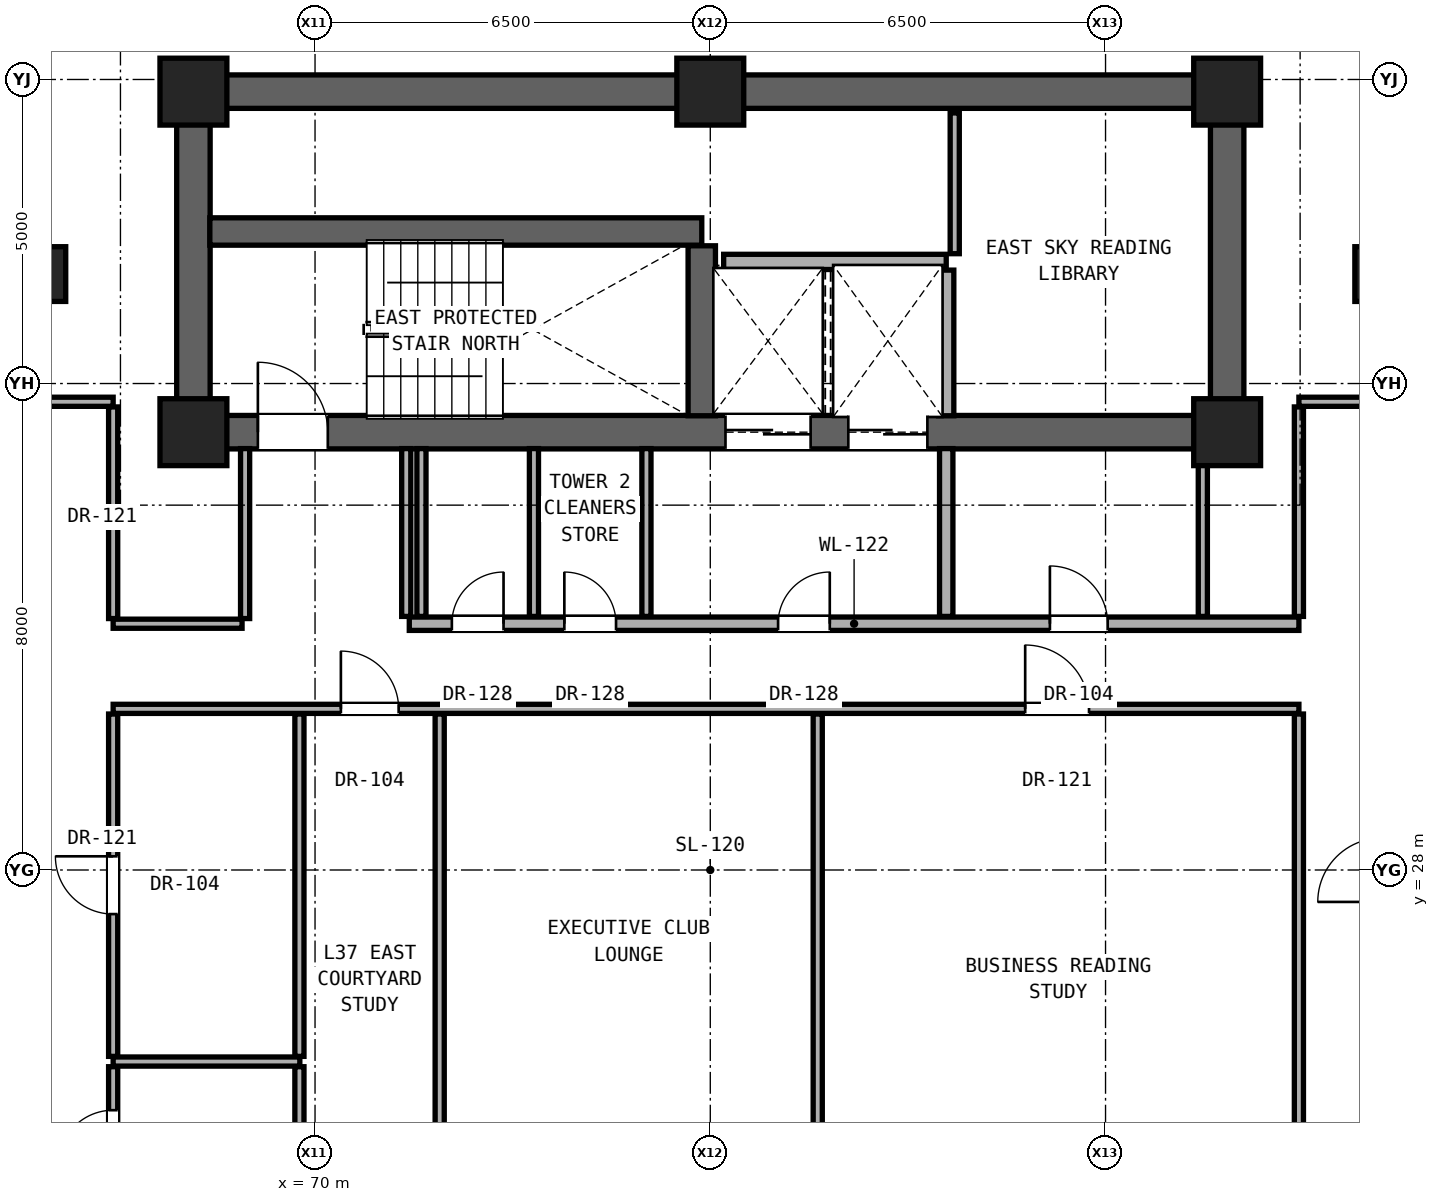
"""IFC4 building model, lengths in metres.
Left out: names, types, materials, properties, quantities, classifications, styles, units other than length and angle.
Written with IfcOpenShell. Run it as: python <this file> out.ifc"""

import sys

from ifc_helpers import new_model, si_unit, direction, frame, frame_2d, origin, origin_2d, place, context, subcontext, project, spatial, rectangle, extrude, element, fill, save


model = new_model("IFC4")
c1 = context("Model", 3, precision=1e-05, world=origin(), true_north=direction((0.0, 1.0)))
c2 = subcontext(c1, "Body", "Model", "MODEL_VIEW")
j1 = project(units=[si_unit("LENGTHUNIT", "METRE"), si_unit("PLANEANGLEUNIT", "RADIAN")], contexts=[c1])
p1 = place(None, origin())
s1 = spatial("IfcSite", under=j1, at=p1, CompositionType="ELEMENT")
p2 = place(p1, origin())
s2 = spatial("IfcBuilding", under=s1, at=p2, CompositionType="ELEMENT")
p3 = place(p2, frame((0.0, 0.0, 131.3)))
s3 = spatial("IfcBuildingStorey", under=s2, at=p3, CompositionType="ELEMENT", Elevation=131.3)
for number, where, z_axis, x_axis in (
    (1, (68.0, 35.2, 0.0), (0.0, 0.0, 1.0), (1.0, 0.0, 0.0)),
    (2, (85.0, 35.2, 0.0), (0.0, 0.0, 1.0), (1.0, 0.0, 0.0)),
    (3, (68.0, 40.8, 0.0), (0.0, 0.0, 1.0), (1.0, 0.0, 0.0)),
    (4, (76.5, 40.8, 0.0), (0.0, 0.0, 1.0), (1.0, 0.0, 0.0)),
    (5, (85.0, 40.8, 0.0), (0.0, 0.0, 1.0), (1.0, 0.0, 0.0)),
):
    element("IfcColumn", number, at=place(p3, frame(where, z_axis=z_axis, x_axis=x_axis)), inside=s3, PredefinedType="COLUMN", context=c2, shape_type="SweptSolid", body=[
        extrude(rectangle(XDim=1.1, YDim=1.1, at=origin_2d()), origin(), (0.0, 0.0, 1.0), 3.3),
    ])
for number, where, z_axis, x_axis in (
    (6, (65.6, 37.8, 0.0), (0.0, 0.0, 1.0), (1.0, 0.0, 0.0)),
    (7, (87.4, 37.8, 0.0), (0.0, 0.0, 1.0), (1.0, 0.0, 0.0)),
):
    element("IfcColumn", number, at=place(p3, frame(where, z_axis=z_axis, x_axis=x_axis)), inside=s3, PredefinedType="PILASTER", context=c2, shape_type="SweptSolid", body=[
        extrude(rectangle(XDim=0.6, YDim=0.9, at=origin_2d()), origin(), (0.0, 0.0, 1.0), 3.3),
    ])
p4 = place(p3, frame((68.0, 40.8, 0.0), z_axis=(0.0, 0.0, 1.0), x_axis=(1.0, 0.0, 0.0)))
e8 = element("IfcWall", 8, at=p4, inside=s3, PredefinedType="SHEAR", context=c2, shape_type="SweptSolid", body=[
    extrude(rectangle(XDim=17.0, YDim=0.55, at=frame_2d((8.5, 0.0))), origin(), (0.0, 0.0, 1.0), 3.08),
])
for number, where, z_axis, x_axis in (
    (9, (68.0, 35.2, 0.0), (0.0, 0.0, 1.0), (0.0, 1.0, 0.0)),
    (10, (85.0, 35.2, 0.0), (0.0, 0.0, 1.0), (0.0, 1.0, 0.0)),
):
    element("IfcWall", number, at=place(p3, frame(where, z_axis=z_axis, x_axis=x_axis)), inside=s3, PredefinedType="SHEAR", context=c2, shape_type="SweptSolid", body=[
        extrude(rectangle(XDim=5.6, YDim=0.55, at=frame_2d((2.8, 0.0))), origin(), (0.0, 0.0, 1.0), 3.08),
    ])
p5 = place(p3, frame((68.0, 35.2, 0.0), z_axis=(0.0, 0.0, 1.0), x_axis=(1.0, 0.0, 0.0)))
e11 = element("IfcWall", 11, at=p5, inside=s3, PredefinedType="SHEAR", context=c2, shape_type="SweptSolid", body=[
    extrude(rectangle(XDim=17.0, YDim=0.55, at=frame_2d((8.5, 0.0))), origin(), (0.0, 0.0, 1.0), 3.08),
])
p6 = place(p5, frame((1.06, 0.0, 0.0)))
e12 = element("IfcOpeningElement", 12, at=p6, cuts=e11, PredefinedType="OPENING", context=c2, shape_type="SweptSolid", body=[
    extrude(rectangle(XDim=1.15, YDim=2.2, at=frame_2d((0.575, 1.1))), frame((0.0, 0.285, 0.0), z_axis=(0.0, -1.0, 0.0), x_axis=(1.0, 0.0, 0.0)), (0.0, 0.0, 1.0), 0.57),
])
p7 = place(p5, frame((8.75, 0.0, 0.0)))
e13 = element("IfcOpeningElement", 13, at=p7, cuts=e11, PredefinedType="OPENING", context=c2, shape_type="SweptSolid", body=[
    extrude(rectangle(XDim=1.4, YDim=2.35, at=frame_2d((0.7, 1.175))), frame((0.0, 0.285, 0.0), z_axis=(0.0, -1.0, 0.0), x_axis=(1.0, 0.0, 0.0)), (0.0, 0.0, 1.0), 0.57),
])
p8 = place(p5, frame((10.77, 0.0, 0.0)))
e14 = element("IfcOpeningElement", 14, at=p8, cuts=e11, PredefinedType="OPENING", context=c2, shape_type="SweptSolid", body=[
    extrude(rectangle(XDim=1.3, YDim=2.3, at=frame_2d((0.65, 1.15))), frame((0.0, 0.285, 0.0), z_axis=(0.0, -1.0, 0.0), x_axis=(1.0, 0.0, 0.0)), (0.0, 0.0, 1.0), 0.57),
])
p9 = place(p3, frame((66.68, 24.85, 0.0), z_axis=(0.0, 0.0, 1.0), x_axis=(1.0, 0.0, 0.0)))
e15 = element("IfcWall", 15, at=p9, inside=s3, PredefinedType="PARTITIONING", context=c2, shape_type="SweptSolid", body=[
    extrude(rectangle(XDim=3.07, YDim=0.15, at=frame_2d((1.535, 0.0))), origin(), (0.0, 0.0, 1.0), 2.216),
])
p10 = place(p3, frame((66.68, 30.65, 0.0), z_axis=(0.0, 0.0, 1.0), x_axis=(1.0, 0.0, 0.0)))
e16 = element("IfcWall", 16, at=p10, inside=s3, PredefinedType="PARTITIONING", context=c2, shape_type="SweptSolid", body=[
    extrude(rectangle(XDim=19.5, YDim=0.15, at=frame_2d((9.75, 0.0))), origin(), (0.0, 0.0, 1.0), 2.216),
])
p11 = place(p10, frame((3.745, 0.0, 0.0)))
e17 = element("IfcOpeningElement", 17, at=p11, cuts=e16, PredefinedType="OPENING", context=c2, shape_type="SweptSolid", body=[
    extrude(rectangle(XDim=0.95, YDim=2.15, at=frame_2d((0.475, 1.075))), frame((0.0, 0.085, 0.0), z_axis=(0.0, -1.0, 0.0), x_axis=(1.0, 0.0, 0.0)), (0.0, 0.0, 1.0), 0.17),
])
p12 = place(p10, frame((14.999, 0.0, 0.0)))
e18 = element("IfcOpeningElement", 18, at=p12, cuts=e16, PredefinedType="OPENING", context=c2, shape_type="SweptSolid", body=[
    extrude(rectangle(XDim=1.05, YDim=2.2, at=frame_2d((0.525, 1.1))), frame((0.0, 0.085, 0.0), z_axis=(0.0, -1.0, 0.0), x_axis=(1.0, 0.0, 0.0)), (0.0, 0.0, 1.0), 0.17),
])
p13 = place(p3, frame((66.68, 32.05, 0.0), z_axis=(0.0, 0.0, 1.0), x_axis=(1.0, 0.0, 0.0)))
e19 = element("IfcWall", 19, at=p13, inside=s3, PredefinedType="PARTITIONING", context=c2, shape_type="SweptSolid", body=[
    extrude(rectangle(XDim=2.12, YDim=0.15, at=frame_2d((1.06, 0.0))), origin(), (0.0, 0.0, 1.0), 2.216),
])
p14 = place(p3, frame((71.55, 32.05, 0.0), z_axis=(0.0, 0.0, 1.0), x_axis=(1.0, 0.0, 0.0)))
e20 = element("IfcWall", 20, at=p14, inside=s3, PredefinedType="SOLIDWALL", context=c2, shape_type="SweptSolid", body=[
    extrude(rectangle(XDim=14.63, YDim=0.22, at=frame_2d((7.315, 0.0))), origin(), (0.0, 0.0, 1.0), 2.216),
])
p15 = place(p14, frame((6.065, 0.0, 0.0)))
e21 = element("IfcOpeningElement", 21, at=p15, cuts=e20, PredefinedType="OPENING", context=c2, shape_type="SweptSolid", body=[
    extrude(rectangle(XDim=0.85, YDim=2.01, at=frame_2d((0.425, 1.005))), frame((0.0, 0.12, 0.0), z_axis=(0.0, -1.0, 0.0), x_axis=(1.0, 0.0, 0.0)), (0.0, 0.0, 1.0), 0.24),
])
p16 = place(p14, frame((10.535, 0.0, 0.0)))
e22 = element("IfcOpeningElement", 22, at=p16, cuts=e20, PredefinedType="OPENING", context=c2, shape_type="SweptSolid", body=[
    extrude(rectangle(XDim=0.95, YDim=2.15, at=frame_2d((0.475, 1.075))), frame((0.0, 0.12, 0.0), z_axis=(0.0, -1.0, 0.0), x_axis=(1.0, 0.0, 0.0)), (0.0, 0.0, 1.0), 0.24),
])
p17 = place(p14, frame((0.7, 0.0, 0.0)))
e23 = element("IfcOpeningElement", 23, at=p17, cuts=e20, PredefinedType="OPENING", context=c2, shape_type="SweptSolid", body=[
    extrude(rectangle(XDim=0.85, YDim=2.01, at=frame_2d((0.425, 1.005))), frame((0.0, 0.12, 0.0), z_axis=(0.0, -1.0, 0.0), x_axis=(1.0, 0.0, 0.0)), (0.0, 0.0, 1.0), 0.24),
])
p18 = place(p14, frame((2.55, 0.0, 0.0)))
e24 = element("IfcOpeningElement", 24, at=p18, cuts=e20, PredefinedType="OPENING", context=c2, shape_type="SweptSolid", body=[
    extrude(rectangle(XDim=0.85, YDim=2.01, at=frame_2d((0.425, 1.005))), frame((0.0, 0.12, 0.0), z_axis=(0.0, -1.0, 0.0), x_axis=(1.0, 0.0, 0.0)), (0.0, 0.0, 1.0), 0.24),
])
p19 = place(p3, frame((65.32, 35.7, 0.0), z_axis=(0.0, 0.0, 1.0), x_axis=(1.0, 0.0, 0.0)))
e25 = element("IfcWall", 25, at=p19, inside=s3, PredefinedType="PARTITIONING", context=c2, shape_type="SweptSolid", body=[
    extrude(rectangle(XDim=1.36, YDim=0.15, at=frame_2d((0.68, 0.0))), origin(), (0.0, 0.0, 1.0), 3.08),
])
p20 = place(p3, frame((86.18, 35.7, 0.0), z_axis=(0.0, 0.0, 1.0), x_axis=(1.0, 0.0, 0.0)))
e26 = element("IfcWall", 26, at=p20, inside=s3, PredefinedType="PARTITIONING", context=c2, shape_type="SweptSolid", body=[
    extrude(rectangle(XDim=1.36, YDim=0.15, at=frame_2d((0.68, 0.0))), origin(), (0.0, 0.0, 1.0), 3.08),
])
p21 = place(p3, frame((76.72, 38.0, 0.0), z_axis=(0.0, 0.0, 1.0), x_axis=(1.0, 0.0, 0.0)))
e27 = element("IfcWall", 27, at=p21, inside=s3, PredefinedType="SOLIDWALL", context=c2, shape_type="SweptSolid", body=[
    extrude(rectangle(XDim=3.66, YDim=0.25, at=frame_2d((1.83, 0.0))), origin(), (0.0, 0.0, 1.0), 3.08),
])
p22 = place(p3, frame((68.27, 38.5, 0.0), z_axis=(0.0, 0.0, 1.0), x_axis=(1.0, 0.0, 0.0)))
e28 = element("IfcWall", 28, at=p22, inside=s3, PredefinedType="SHEAR", context=c2, shape_type="SweptSolid", body=[
    extrude(rectangle(XDim=8.09, YDim=0.45, at=frame_2d((4.045, 0.0))), origin(), (0.0, 0.0, 1.0), 3.08),
])
p23 = place(p3, frame((66.68, 22.435, 0.0), z_axis=(0.0, 0.0, 1.0), x_axis=(0.0, 1.0, 0.0)))
e29 = element("IfcWall", 29, at=p23, inside=s3, PredefinedType="PARTITIONING", context=c2, shape_type="SweptSolid", body=[
    extrude(rectangle(XDim=2.33, YDim=0.15, at=frame_2d((1.165, 0.0))), origin(), (0.0, 0.0, 1.0), 3.08),
])
p24 = place(p23, frame((0.715, 0.0, 0.0)))
e30 = element("IfcOpeningElement", 30, at=p24, cuts=e29, PredefinedType="OPENING", context=c2, shape_type="SweptSolid", body=[
    extrude(rectangle(XDim=0.9, YDim=2.1, at=frame_2d((0.45, 1.05))), frame((0.0, 0.085, 0.0), z_axis=(0.0, -1.0, 0.0), x_axis=(1.0, 0.0, 0.0)), (0.0, 0.0, 1.0), 0.17),
])
p25 = place(p3, frame((66.68, 24.935, 0.0), z_axis=(0.0, 0.0, 1.0), x_axis=(0.0, 1.0, 0.0)))
e31 = element("IfcWall", 31, at=p25, inside=s3, PredefinedType="PARTITIONING", context=c2, shape_type="SweptSolid", body=[
    extrude(rectangle(XDim=5.63, YDim=0.15, at=frame_2d((2.815, 0.0))), origin(), (0.0, 0.0, 1.0), 2.376),
])
p26 = place(p25, frame((2.34, 0.0, 0.0)))
e32 = element("IfcOpeningElement", 32, at=p26, cuts=e31, PredefinedType="OPENING", context=c2, shape_type="SweptSolid", body=[
    extrude(rectangle(XDim=0.95, YDim=2.15, at=frame_2d((0.475, 1.075))), frame((0.0, 0.085, 0.0), z_axis=(0.0, -1.0, 0.0), x_axis=(1.0, 0.0, 0.0)), (0.0, 0.0, 1.0), 0.17),
])
p27 = place(p3, frame((66.68, 32.135, 0.0), z_axis=(0.0, 0.0, 1.0), x_axis=(0.0, 1.0, 0.0)))
e33 = element("IfcWall", 33, at=p27, inside=s3, PredefinedType="PARTITIONING", context=c2, shape_type="SweptSolid", body=[
    extrude(rectangle(XDim=3.48, YDim=0.15, at=frame_2d((1.74, 0.0))), origin(), (0.0, 0.0, 1.0), 2.472),
])
p28 = place(p3, frame((68.85, 32.135, 0.0), z_axis=(0.0, 0.0, 1.0), x_axis=(0.0, 1.0, 0.0)))
e34 = element("IfcWall", 34, at=p28, inside=s3, PredefinedType="PARTITIONING", context=c2, shape_type="SweptSolid", body=[
    extrude(rectangle(XDim=2.795, YDim=0.15, at=frame_2d((1.397, 0.0))), origin(), (0.0, 0.0, 1.0), 3.08),
])
p29 = place(p3, frame((69.743, 22.435, 0.0), z_axis=(0.0, 0.0, 1.0), x_axis=(0.0, 1.0, 0.0)))
e35 = element("IfcWall", 35, at=p29, inside=s3, PredefinedType="PARTITIONING", context=c2, shape_type="SweptSolid", body=[
    extrude(rectangle(XDim=2.33, YDim=0.15, at=frame_2d((1.165, 0.0))), origin(), (0.0, 0.0, 1.0), 3.08),
])
p30 = place(p3, frame((69.743, 24.935, 0.0), z_axis=(0.0, 0.0, 1.0), x_axis=(0.0, 1.0, 0.0)))
e36 = element("IfcWall", 36, at=p30, inside=s3, PredefinedType="PARTITIONING", context=c2, shape_type="SweptSolid", body=[
    extrude(rectangle(XDim=5.63, YDim=0.15, at=frame_2d((2.815, 0.0))), origin(), (0.0, 0.0, 1.0), 2.216),
])
for number, where, z_axis, x_axis in (
    (37, (71.5, 32.17, 0.0), (0.0, 0.0, 1.0), (0.0, 1.0, 0.0)),
    (38, (71.75, 32.17, 0.0), (0.0, 0.0, 1.0), (0.0, 1.0, 0.0)),
):
    element("IfcWall", number, at=place(p3, frame(where, z_axis=z_axis, x_axis=x_axis)), inside=s3, PredefinedType="PARTITIONING", context=c2, shape_type="SweptSolid", body=[
        extrude(rectangle(XDim=2.76, YDim=0.15, at=frame_2d((1.38, 0.0))), origin(), (0.0, 0.0, 1.0), 3.08),
    ])
p31 = place(p3, frame((72.05, 22.435, 0.0), z_axis=(0.0, 0.0, 1.0), x_axis=(0.0, 1.0, 0.0)))
e39 = element("IfcWall", 39, at=p31, inside=s3, PredefinedType="PARTITIONING", context=c2, shape_type="SweptSolid", body=[
    extrude(rectangle(XDim=8.13, YDim=0.15, at=frame_2d((4.065, 0.0))), origin(), (0.0, 0.0, 1.0), 2.216),
])
for number, where, z_axis, x_axis in (
    (40, (73.6, 32.17, 0.0), (0.0, 0.0, 1.0), (0.0, 1.0, 0.0)),
    (41, (75.45, 32.17, 0.0), (0.0, 0.0, 1.0), (0.0, 1.0, 0.0)),
):
    element("IfcWall", number, at=place(p3, frame(where, z_axis=z_axis, x_axis=x_axis)), inside=s3, PredefinedType="PARTITIONING", context=c2, shape_type="SweptSolid", body=[
        extrude(rectangle(XDim=2.76, YDim=0.15, at=frame_2d((1.38, 0.0))), origin(), (0.0, 0.0, 1.0), 3.08),
    ])
p32 = place(p3, frame((76.36, 35.47, 0.0), z_axis=(0.0, 0.0, 1.0), x_axis=(0.0, 1.0, 0.0)))
e42 = element("IfcWall", 42, at=p32, inside=s3, PredefinedType="SHEAR", context=c2, shape_type="SweptSolid", body=[
    extrude(rectangle(XDim=2.795, YDim=0.45, at=frame_2d((1.397, 0.0))), origin(), (0.0, 0.0, 1.0), 3.08),
])
p33 = place(p3, frame((78.267, 22.435, 0.0), z_axis=(0.0, 0.0, 1.0), x_axis=(0.0, 1.0, 0.0)))
e43 = element("IfcWall", 43, at=p33, inside=s3, PredefinedType="PARTITIONING", context=c2, shape_type="SweptSolid", body=[
    extrude(rectangle(XDim=8.13, YDim=0.15, at=frame_2d((4.065, 0.0))), origin(), (0.0, 0.0, 1.0), 2.216),
])
p34 = place(p3, frame((80.38, 32.17, 0.0), z_axis=(0.0, 0.0, 1.0), x_axis=(0.0, 1.0, 0.0)))
e44 = element("IfcWall", 44, at=p34, inside=s3, PredefinedType="SOLIDWALL", context=c2, shape_type="SweptSolid", body=[
    extrude(rectangle(XDim=2.76, YDim=0.22, at=frame_2d((1.38, 0.0))), origin(), (0.0, 0.0, 1.0), 3.08),
])
p35 = place(p3, frame((80.38, 35.47, 0.0), z_axis=(0.0, 0.0, 1.0), x_axis=(0.0, 1.0, 0.0)))
e45 = element("IfcWall", 45, at=p35, inside=s3, PredefinedType="SOLIDWALL", context=c2, shape_type="SweptSolid", body=[
    extrude(rectangle(XDim=2.395, YDim=0.25, at=frame_2d((1.198, 0.0))), origin(), (0.0, 0.0, 1.0), 3.08),
])
p36 = place(p3, frame((80.52, 38.135, 0.0), z_axis=(0.0, 0.0, 1.0), x_axis=(0.0, 1.0, 0.0)))
e46 = element("IfcWall", 46, at=p36, inside=s3, PredefinedType="PARTITIONING", context=c2, shape_type="SweptSolid", body=[
    extrude(rectangle(XDim=2.315, YDim=0.15, at=frame_2d((1.157, 0.0))), origin(), (0.0, 0.0, 1.0), 3.08),
])
p37 = place(p3, frame((84.6, 32.17, 0.0), z_axis=(0.0, 0.0, 1.0), x_axis=(0.0, 1.0, 0.0)))
e47 = element("IfcWall", 47, at=p37, inside=s3, PredefinedType="PARTITIONING", context=c2, shape_type="SweptSolid", body=[
    extrude(rectangle(XDim=2.76, YDim=0.15, at=frame_2d((1.38, 0.0))), origin(), (0.0, 0.0, 1.0), 3.08),
])
p38 = place(p3, frame((86.18, 22.435, 0.0), z_axis=(0.0, 0.0, 1.0), x_axis=(0.0, 1.0, 0.0)))
e48 = element("IfcWall", 48, at=p38, inside=s3, PredefinedType="PARTITIONING", context=c2, shape_type="SweptSolid", body=[
    extrude(rectangle(XDim=8.13, YDim=0.15, at=frame_2d((4.065, 0.0))), origin(), (0.0, 0.0, 1.0), 2.376),
])
p39 = place(p3, frame((86.18, 32.17, 0.0), z_axis=(0.0, 0.0, 1.0), x_axis=(0.0, 1.0, 0.0)))
e49 = element("IfcWall", 49, at=p39, inside=s3, PredefinedType="PARTITIONING", context=c2, shape_type="SweptSolid", body=[
    extrude(rectangle(XDim=3.445, YDim=0.15, at=frame_2d((1.723, 0.0))), origin(), (0.0, 0.0, 1.0), 2.472),
])
p40 = place(p6, origin())
e50 = element("IfcDoor", 50, at=p40, inside=s3, OperationType="SINGLE_SWING_LEFT", PredefinedType="DOOR", context=c2, shape_type="SweptSolid", body=[
    extrude(rectangle(XDim=1.15, YDim=2.2, at=frame_2d((0.575, 1.1))), frame((0.0, 0.025, 0.0), z_axis=(0.0, -1.0, 0.0), x_axis=(1.0, 0.0, 0.0)), (0.0, 0.0, 1.0), 0.05),
])
fill(e12, e50)
p41 = place(p15, origin())
e51 = element("IfcDoor", 51, at=p41, inside=s3, OperationType="SINGLE_SWING_RIGHT", PredefinedType="DOOR", context=c2, shape_type="SweptSolid", body=[
    extrude(rectangle(XDim=0.85, YDim=2.01, at=frame_2d((0.425, 1.005))), frame((0.0, 0.025, 0.0), z_axis=(0.0, -1.0, 0.0), x_axis=(1.0, 0.0, 0.0)), (0.0, 0.0, 1.0), 0.05),
])
fill(e21, e51)
p42 = place(p16, origin())
e52 = element("IfcDoor", 52, at=p42, inside=s3, OperationType="SINGLE_SWING_LEFT", PredefinedType="DOOR", context=c2, shape_type="SweptSolid", body=[
    extrude(rectangle(XDim=0.95, YDim=2.15, at=frame_2d((0.475, 1.075))), frame((0.0, 0.025, 0.0), z_axis=(0.0, -1.0, 0.0), x_axis=(1.0, 0.0, 0.0)), (0.0, 0.0, 1.0), 0.05),
])
fill(e22, e52)
p43 = place(p17, origin())
e53 = element("IfcDoor", 53, at=p43, inside=s3, OperationType="SINGLE_SWING_RIGHT", PredefinedType="DOOR", context=c2, shape_type="SweptSolid", body=[
    extrude(rectangle(XDim=0.85, YDim=2.01, at=frame_2d((0.425, 1.005))), frame((0.0, 0.025, 0.0), z_axis=(0.0, -1.0, 0.0), x_axis=(1.0, 0.0, 0.0)), (0.0, 0.0, 1.0), 0.05),
])
fill(e23, e53)
p44 = place(p18, origin())
e54 = element("IfcDoor", 54, at=p44, inside=s3, OperationType="SINGLE_SWING_LEFT", PredefinedType="DOOR", context=c2, shape_type="SweptSolid", body=[
    extrude(rectangle(XDim=0.85, YDim=2.01, at=frame_2d((0.425, 1.005))), frame((0.0, 0.025, 0.0), z_axis=(0.0, -1.0, 0.0), x_axis=(1.0, 0.0, 0.0)), (0.0, 0.0, 1.0), 0.05),
])
fill(e24, e54)
p45 = place(p24, origin())
e55 = element("IfcDoor", 55, at=p45, inside=s3, OperationType="SINGLE_SWING_LEFT", PredefinedType="DOOR", context=c2, shape_type="SweptSolid", body=[
    extrude(rectangle(XDim=0.9, YDim=2.1, at=frame_2d((0.45, 1.05))), frame((0.0, 0.025, 0.0), z_axis=(0.0, -1.0, 0.0), x_axis=(1.0, 0.0, 0.0)), (0.0, 0.0, 1.0), 0.05),
])
fill(e30, e55)
p46 = place(p26, origin())
e56 = element("IfcDoor", 56, at=p46, inside=s3, OperationType="SINGLE_SWING_RIGHT", PredefinedType="DOOR", context=c2, shape_type="SweptSolid", body=[
    extrude(rectangle(XDim=0.95, YDim=2.15, at=frame_2d((0.475, 1.075))), frame((0.0, 0.025, 0.0), z_axis=(0.0, -1.0, 0.0), x_axis=(1.0, 0.0, 0.0)), (0.0, 0.0, 1.0), 0.05),
])
fill(e32, e56)
p47 = place(p11, origin())
e57 = element("IfcDoor", 57, at=p47, inside=s3, OperationType="SINGLE_SWING_LEFT", PredefinedType="DOOR", context=c2, shape_type="SweptSolid", body=[
    extrude(rectangle(XDim=0.95, YDim=2.15, at=frame_2d((0.475, 1.075))), frame((0.0, 0.025, 0.0), z_axis=(0.0, -1.0, 0.0), x_axis=(1.0, 0.0, 0.0)), (0.0, 0.0, 1.0), 0.05),
])
fill(e17, e57)
p48 = place(p12, origin())
e58 = element("IfcDoor", 58, at=p48, inside=s3, OperationType="SINGLE_SWING_LEFT", PredefinedType="DOOR", context=c2, shape_type="SweptSolid", body=[
    extrude(rectangle(XDim=1.05, YDim=2.2, at=frame_2d((0.525, 1.1))), frame((0.0, 0.025, 0.0), z_axis=(0.0, -1.0, 0.0), x_axis=(1.0, 0.0, 0.0)), (0.0, 0.0, 1.0), 0.05),
])
fill(e18, e58)
p49 = place(p7, origin())
e59 = element("IfcDoor", 59, at=p49, inside=s3, OperationType="DOUBLE_DOOR_SLIDING", PredefinedType="DOOR", context=c2, shape_type="SweptSolid", body=[
    extrude(rectangle(XDim=1.4, YDim=2.35, at=frame_2d((0.7, 1.175))), frame((0.0, 0.025, 0.0), z_axis=(0.0, -1.0, 0.0), x_axis=(1.0, 0.0, 0.0)), (0.0, 0.0, 1.0), 0.05),
])
fill(e13, e59)
p50 = place(p8, origin())
e60 = element("IfcDoor", 60, at=p50, inside=s3, OperationType="DOUBLE_DOOR_SLIDING", PredefinedType="DOOR", context=c2, shape_type="SweptSolid", body=[
    extrude(rectangle(XDim=1.3, YDim=2.3, at=frame_2d((0.65, 1.15))), frame((0.0, 0.025, 0.0), z_axis=(0.0, -1.0, 0.0), x_axis=(1.0, 0.0, 0.0)), (0.0, 0.0, 1.0), 0.05),
])
fill(e14, e60)
save(model, sys.argv[1])
